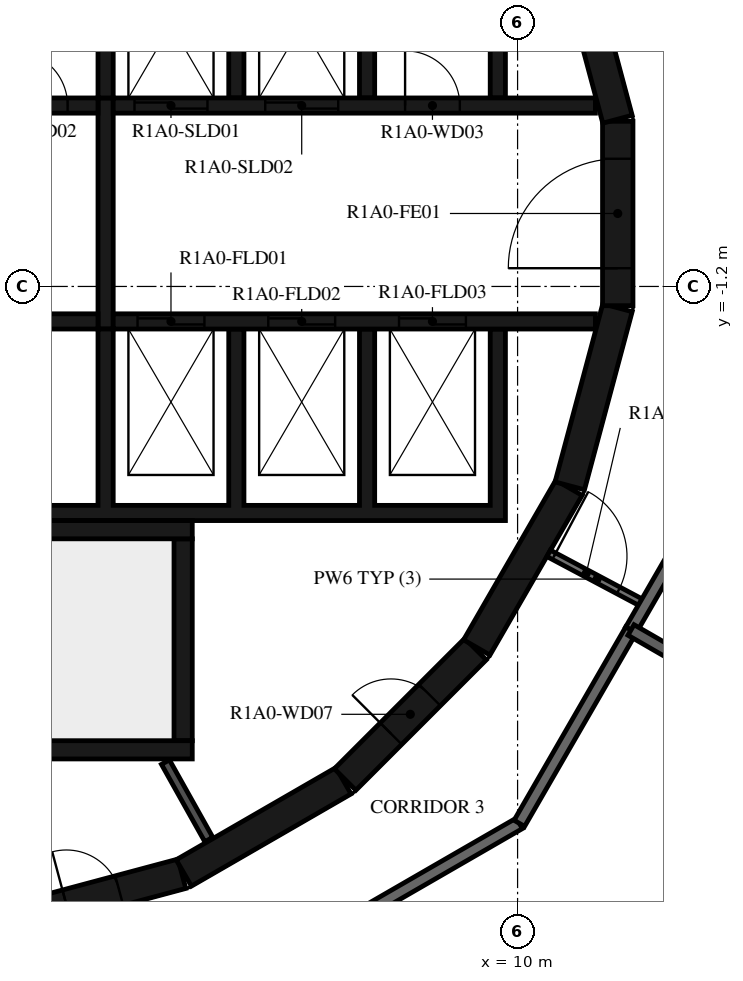
"""IFC4 building model, lengths in metres.
Left out: names, types, materials, properties, quantities, classifications, styles, units other than length and angle.
Written with IfcOpenShell. Run it as: python <this file> out.ifc"""

import sys

from ifc_helpers import new_model, si_unit, direction, frame, frame_2d, origin, place, context, subcontext, project, spatial, polyline, rectangle, outline, extrude, element, fill, save


model = new_model("IFC4")
c1 = context("Model", 3, precision=1e-05, world=origin(), true_north=direction((0.0, 1.0)))
c2 = subcontext(c1, "Body", "Model", "MODEL_VIEW")
j1 = project(units=[si_unit("LENGTHUNIT", "METRE"), si_unit("PLANEANGLEUNIT", "RADIAN")], contexts=[c1])
p1 = place(None, origin())
s1 = spatial("IfcSite", under=j1, at=p1, CompositionType="ELEMENT")
p2 = place(p1, origin())
s2 = spatial("IfcBuilding", under=s1, at=p2, CompositionType="ELEMENT")
p3 = place(p2, frame((0.0, 0.0, 45.4)))
s3 = spatial("IfcBuildingStorey", under=s2, at=p3, CompositionType="ELEMENT", Elevation=45.4)
p4 = place(p3, frame((1.55, -11.643, 0.0), z_axis=(0.0, 0.0, 1.0), x_axis=(0.965948410781, 0.258734743916, 0.0)))
e1 = element("IfcWall", 1, at=p4, inside=s3, PredefinedType="SHEAR", context=c2, shape_type="SweptSolid", body=[
    extrude(rectangle(XDim=3.033, YDim=0.5, at=frame_2d((1.516, 0.0))), origin(), (0.0, 0.0, 1.0), 3.12),
])
p5 = place(p4, frame((1.066, 0.0, 0.0)))
e2 = element("IfcOpeningElement", 2, at=p5, cuts=e1, PredefinedType="OPENING", context=c2, shape_type="SweptSolid", body=[
    extrude(rectangle(XDim=0.9, YDim=2.1, at=frame_2d((0.45, 1.05))), frame((0.0, 0.26, 0.0), z_axis=(0.0, -1.0, 0.0), x_axis=(1.0, 0.0, 0.0)), (0.0, 0.0, 1.0), 0.52),
])
p6 = place(p3, frame((4.51, -10.845, 0.0), z_axis=(0.0, 0.0, 1.0), x_axis=(0.865975092491, 0.500087131594, 0.0)))
e3 = element("IfcWall", 3, at=p6, inside=s3, PredefinedType="SHEAR", context=c2, shape_type="SweptSolid", body=[
    extrude(rectangle(XDim=3.033, YDim=0.5, at=frame_2d((1.516, 0.0))), origin(), (0.0, 0.0, 1.0), 3.12),
])
p7 = place(p3, frame((7.164, -9.308, 0.0), z_axis=(0.0, 0.0, 1.0), x_axis=(0.707106781187, 0.707106781187, 0.0)))
e4 = element("IfcWall", 4, at=p7, inside=s3, PredefinedType="SHEAR", context=c2, shape_type="SweptSolid", body=[
    extrude(rectangle(XDim=3.032, YDim=0.5, at=frame_2d((1.516, 0.0))), origin(), (0.0, 0.0, 1.0), 3.12),
])
p8 = place(p7, frame((1.066, 0.0, 0.0)))
e5 = element("IfcOpeningElement", 5, at=p8, cuts=e4, PredefinedType="OPENING", context=c2, shape_type="SweptSolid", body=[
    extrude(rectangle(XDim=0.9, YDim=2.1, at=frame_2d((0.45, 1.05))), frame((0.0, 0.26, 0.0), z_axis=(0.0, -1.0, 0.0), x_axis=(1.0, 0.0, 0.0)), (0.0, 0.0, 1.0), 0.52),
])
for number, where, z_axis, x_axis in (
    (6, (9.329, -7.137, 0.0), (0.0, 0.0, 1.0), (0.5, 0.866, 0.0)),
    (7, (10.858, -4.479, 0.0), (0.0, 0.0, 1.0), (0.259, 0.966, 0.0)),
):
    element("IfcWall", number, at=place(p3, frame(where, z_axis=z_axis, x_axis=x_axis)), inside=s3, PredefinedType="SHEAR", context=c2, shape_type="SweptSolid", body=[
        extrude(rectangle(XDim=3.033, YDim=0.5, at=frame_2d((1.516, 0.0))), origin(), (0.0, 0.0, 1.0), 3.12),
    ])
p9 = place(p3, frame((11.647, -1.516, 0.0), z_axis=(0.0, 0.0, 1.0), x_axis=(0.0, 1.0, 0.0)))
e8 = element("IfcWall", 8, at=p9, inside=s3, PredefinedType="SHEAR", context=c2, shape_type="SweptSolid", body=[
    extrude(rectangle(XDim=3.033, YDim=0.5, at=frame_2d((1.516, 0.0))), origin(), (0.0, 0.0, 1.0), 3.12),
])
p10 = place(p9, frame((0.616, 0.0, 0.0)))
e9 = element("IfcOpeningElement", 9, at=p10, cuts=e8, PredefinedType="OPENING", context=c2, shape_type="SweptSolid", body=[
    extrude(rectangle(XDim=1.8, YDim=2.1, at=frame_2d((0.9, 1.05))), frame((0.0, 0.26, 0.0), z_axis=(0.0, -1.0, 0.0), x_axis=(1.0, 0.0, 0.0)), (0.0, 0.0, 1.0), 0.52),
])
p11 = place(p3, frame((11.643, 1.55, 0.0), z_axis=(0.0, 0.0, 1.0), x_axis=(-0.258734743916, 0.965948410781, 0.0)))
e10 = element("IfcWall", 10, at=p11, inside=s3, PredefinedType="SHEAR", context=c2, shape_type="SweptSolid", body=[
    extrude(rectangle(XDim=3.033, YDim=0.5, at=frame_2d((1.516, 0.0))), origin(), (0.0, 0.0, 1.0), 3.12),
])
p12 = place(p3, frame((-2.4, -5.2, 0.0), z_axis=(0.0, 0.0, 1.0), x_axis=(1.0, 0.0, 0.0)))
e11 = element("IfcWall", 11, at=p12, inside=s3, PredefinedType="SHEAR", context=c2, shape_type="SweptSolid", body=[
    extrude(rectangle(XDim=7.05, YDim=0.3, at=frame_2d((3.525, 0.0))), origin(), (0.0, 0.0, 1.0), 3.12),
])
p13 = place(p3, frame((4.5, -8.67, 0.0), z_axis=(0.0, 0.0, 1.0), x_axis=(0.0, 1.0, 0.0)))
e12 = element("IfcWall", 12, at=p13, inside=s3, PredefinedType="SHEAR", context=c2, shape_type="SweptSolid", body=[
    extrude(rectangle(XDim=3.32, YDim=0.3, at=frame_2d((1.66, 0.0))), origin(), (0.0, 0.0, 1.0), 3.12),
])
p14 = place(p3, frame((0.1, -8.82, 0.0), z_axis=(0.0, 0.0, 1.0), x_axis=(1.0, 0.0, 0.0)))
e13 = element("IfcWall", 13, at=p14, inside=s3, PredefinedType="SHEAR", context=c2, shape_type="SweptSolid", body=[
    extrude(rectangle(XDim=4.55, YDim=0.3, at=frame_2d((2.275, 0.0))), origin(), (0.0, 0.0, 1.0), 3.12),
])
p15 = place(p3, origin())
e14 = element("IfcWall", 14, at=p15, inside=s3, PredefinedType="SHEAR", context=c2, shape_type="SweptSolid", body=[
    extrude(outline(polyline([(-9.55, 4.8), (-7.65, 4.8), (-7.65, 1.9), (-7.4, 1.9), (-7.4, 4.8), (-5.5, 4.8), (-5.5, 1.9), (-5.25, 1.9), (-5.25, 4.8), (-3.35, 4.8), (-3.35, 1.9), (-3.1, 1.9), (-3.1, 4.8), (-1.2, 4.8), (-1.2, 1.9), (-0.95, 1.9), (-0.95, 4.8), (0.95, 4.8), (0.95, 1.9), (1.2, 1.9), (1.2, 4.8), (3.1, 4.8), (3.1, 1.9), (3.35, 1.9), (3.35, 4.8), (5.25, 4.8), (5.25, 1.9), (5.5, 1.9), (5.5, 4.8), (7.4, 4.8), (7.4, 1.9), (7.65, 1.9), (7.65, 4.8), (9.55, 4.8), (9.55, 1.9), (9.8, 1.9), (9.8, 4.8), (9.8, 5.05), (-9.8, 5.05), (-9.8, 4.8), (-9.8, 1.9), (-9.55, 1.9), (-9.55, 4.8)])), origin(), (0.0, 0.0, 1.0), 3.12),
])
p16 = place(p3, origin())
e15 = element("IfcWall", 15, at=p16, inside=s3, PredefinedType="SHEAR", context=c2, shape_type="SweptSolid", body=[
    extrude(outline(polyline([(9.8, -5.05), (9.8, -4.8), (9.8, -1.9), (9.55, -1.9), (9.55, -4.8), (7.65, -4.8), (7.65, -1.9), (7.4, -1.9), (7.4, -4.8), (5.5, -4.8), (5.5, -1.9), (5.25, -1.9), (5.25, -4.8), (3.35, -4.8), (3.35, -1.9), (3.1, -1.9), (3.1, -4.8), (-5.25, -4.8), (-5.25, -1.9), (-5.5, -1.9), (-5.5, -4.8), (-7.4, -4.8), (-7.4, -1.9), (-7.65, -1.9), (-7.65, -4.8), (-9.55, -4.8), (-9.55, -1.9), (-9.8, -1.9), (-9.8, -4.8), (-9.8, -5.05), (9.8, -5.05)])), origin(), (0.0, 0.0, 1.0), 3.12),
])
p17 = place(p3, frame((-11.28, 1.775, 0.0), z_axis=(0.0, 0.0, 1.0), x_axis=(1.0, 0.0, 0.0)))
e16 = element("IfcWall", 16, at=p17, inside=s3, PredefinedType="SHEAR", context=c2, shape_type="SweptSolid", body=[
    extrude(rectangle(XDim=14.38, YDim=0.25, at=frame_2d((7.19, 0.0))), origin(), (0.0, 0.0, 1.0), 3.12),
])
p18 = place(p17, frame((2.13, 0.0, 0.0)))
e17 = element("IfcOpeningElement", 17, at=p18, cuts=e16, PredefinedType="OPENING", context=c2, shape_type="SweptSolid", body=[
    extrude(rectangle(XDim=1.1, YDim=2.1, at=frame_2d((0.55, 1.05))), frame((0.0, 0.135, 0.0), z_axis=(0.0, -1.0, 0.0), x_axis=(1.0, 0.0, 0.0)), (0.0, 0.0, 1.0), 0.27),
])
p19 = place(p17, frame((4.28, 0.0, 0.0)))
e18 = element("IfcOpeningElement", 18, at=p19, cuts=e16, PredefinedType="OPENING", context=c2, shape_type="SweptSolid", body=[
    extrude(rectangle(XDim=1.1, YDim=2.1, at=frame_2d((0.55, 1.05))), frame((0.0, 0.135, 0.0), z_axis=(0.0, -1.0, 0.0), x_axis=(1.0, 0.0, 0.0)), (0.0, 0.0, 1.0), 0.27),
])
p20 = place(p17, frame((6.43, 0.0, 0.0)))
e19 = element("IfcOpeningElement", 19, at=p20, cuts=e16, PredefinedType="OPENING", context=c2, shape_type="SweptSolid", body=[
    extrude(rectangle(XDim=1.1, YDim=2.1, at=frame_2d((0.55, 1.05))), frame((0.0, 0.135, 0.0), z_axis=(0.0, -1.0, 0.0), x_axis=(1.0, 0.0, 0.0)), (0.0, 0.0, 1.0), 0.27),
])
p21 = place(p17, frame((8.58, 0.0, 0.0)))
e20 = element("IfcOpeningElement", 20, at=p21, cuts=e16, PredefinedType="OPENING", context=c2, shape_type="SweptSolid", body=[
    extrude(rectangle(XDim=1.1, YDim=2.1, at=frame_2d((0.55, 1.05))), frame((0.0, 0.135, 0.0), z_axis=(0.0, -1.0, 0.0), x_axis=(1.0, 0.0, 0.0)), (0.0, 0.0, 1.0), 0.27),
])
p22 = place(p17, frame((10.83, 0.0, 0.0)))
e21 = element("IfcOpeningElement", 21, at=p22, cuts=e16, PredefinedType="OPENING", context=c2, shape_type="SweptSolid", body=[
    extrude(rectangle(XDim=0.9, YDim=2.1, at=frame_2d((0.45, 1.05))), frame((0.0, 0.135, 0.0), z_axis=(0.0, -1.0, 0.0), x_axis=(1.0, 0.0, 0.0)), (0.0, 0.0, 1.0), 0.27),
])
p23 = place(p17, frame((12.98, 0.0, 0.0)))
e22 = element("IfcOpeningElement", 22, at=p23, cuts=e16, PredefinedType="OPENING", context=c2, shape_type="SweptSolid", body=[
    extrude(rectangle(XDim=0.9, YDim=2.1, at=frame_2d((0.45, 1.05))), frame((0.0, 0.135, 0.0), z_axis=(0.0, -1.0, 0.0), x_axis=(1.0, 0.0, 0.0)), (0.0, 0.0, 1.0), 0.27),
])
p24 = place(p3, frame((3.35, 1.775, 0.0), z_axis=(0.0, 0.0, 1.0), x_axis=(1.0, 0.0, 0.0)))
e23 = element("IfcWall", 23, at=p24, inside=s3, PredefinedType="SHEAR", context=c2, shape_type="SweptSolid", body=[
    extrude(rectangle(XDim=7.93, YDim=0.25, at=frame_2d((3.965, 0.0))), origin(), (0.0, 0.0, 1.0), 3.12),
])
p25 = place(p24, frame((0.35, 0.0, 0.0)))
e24 = element("IfcOpeningElement", 24, at=p25, cuts=e23, PredefinedType="OPENING", context=c2, shape_type="SweptSolid", body=[
    extrude(rectangle(XDim=1.2, YDim=2.4, at=frame_2d((0.6, 1.2))), frame((0.0, 0.135, 0.0), z_axis=(0.0, -1.0, 0.0), x_axis=(1.0, 0.0, 0.0)), (0.0, 0.0, 1.0), 0.27),
])
p26 = place(p24, frame((2.5, 0.0, 0.0)))
e25 = element("IfcOpeningElement", 25, at=p26, cuts=e23, PredefinedType="OPENING", context=c2, shape_type="SweptSolid", body=[
    extrude(rectangle(XDim=1.2, YDim=2.4, at=frame_2d((0.6, 1.2))), frame((0.0, 0.135, 0.0), z_axis=(0.0, -1.0, 0.0), x_axis=(1.0, 0.0, 0.0)), (0.0, 0.0, 1.0), 0.27),
])
p27 = place(p24, frame((4.8, 0.0, 0.0)))
e26 = element("IfcOpeningElement", 26, at=p27, cuts=e23, PredefinedType="OPENING", context=c2, shape_type="SweptSolid", body=[
    extrude(rectangle(XDim=0.9, YDim=2.1, at=frame_2d((0.45, 1.05))), frame((0.0, 0.135, 0.0), z_axis=(0.0, -1.0, 0.0), x_axis=(1.0, 0.0, 0.0)), (0.0, 0.0, 1.0), 0.27),
])
p28 = place(p3, frame((-11.28, -1.775, 0.0), z_axis=(0.0, 0.0, 1.0), x_axis=(1.0, 0.0, 0.0)))
e27 = element("IfcWall", 27, at=p28, inside=s3, PredefinedType="SHEAR", context=c2, shape_type="SweptSolid", body=[
    extrude(rectangle(XDim=14.38, YDim=0.25, at=frame_2d((7.19, 0.0))), origin(), (0.0, 0.0, 1.0), 3.12),
])
p29 = place(p28, frame((9.755, 0.0, 0.0)))
e28 = element("IfcOpeningElement", 28, at=p29, cuts=e27, PredefinedType="OPENING", context=c2, shape_type="SweptSolid", body=[
    extrude(rectangle(XDim=0.9, YDim=2.1, at=frame_2d((0.45, 1.05))), frame((0.0, 0.135, 0.0), z_axis=(0.0, -1.0, 0.0), x_axis=(1.0, 0.0, 0.0)), (0.0, 0.0, 1.0), 0.27),
])
p30 = place(p3, frame((3.35, -1.775, 0.0), z_axis=(0.0, 0.0, 1.0), x_axis=(1.0, 0.0, 0.0)))
e29 = element("IfcWall", 29, at=p30, inside=s3, PredefinedType="SHEAR", context=c2, shape_type="SweptSolid", body=[
    extrude(rectangle(XDim=7.93, YDim=0.25, at=frame_2d((3.965, 0.0))), origin(), (0.0, 0.0, 1.0), 3.12),
])
p31 = place(p30, frame((0.4, 0.0, 0.0)))
e30 = element("IfcOpeningElement", 30, at=p31, cuts=e29, PredefinedType="OPENING", context=c2, shape_type="SweptSolid", body=[
    extrude(rectangle(XDim=1.1, YDim=2.4, at=frame_2d((0.55, 1.2))), frame((0.0, 0.135, 0.0), z_axis=(0.0, -1.0, 0.0), x_axis=(1.0, 0.0, 0.0)), (0.0, 0.0, 1.0), 0.27),
])
p32 = place(p30, frame((2.55, 0.0, 0.0)))
e31 = element("IfcOpeningElement", 31, at=p32, cuts=e29, PredefinedType="OPENING", context=c2, shape_type="SweptSolid", body=[
    extrude(rectangle(XDim=1.1, YDim=2.4, at=frame_2d((0.55, 1.2))), frame((0.0, 0.135, 0.0), z_axis=(0.0, -1.0, 0.0), x_axis=(1.0, 0.0, 0.0)), (0.0, 0.0, 1.0), 0.27),
])
p33 = place(p30, frame((4.7, 0.0, 0.0)))
e32 = element("IfcOpeningElement", 32, at=p33, cuts=e29, PredefinedType="OPENING", context=c2, shape_type="SweptSolid", body=[
    extrude(rectangle(XDim=1.1, YDim=2.4, at=frame_2d((0.55, 1.2))), frame((0.0, 0.135, 0.0), z_axis=(0.0, -1.0, 0.0), x_axis=(1.0, 0.0, 0.0)), (0.0, 0.0, 1.0), 0.27),
])
p34 = place(p3, frame((3.225, -1.9, 0.0), z_axis=(0.0, 0.0, 1.0), x_axis=(0.0, 1.0, 0.0)))
e33 = element("IfcWall", 33, at=p34, inside=s3, PredefinedType="SHEAR", context=c2, shape_type="SweptSolid", body=[
    extrude(rectangle(XDim=3.8, YDim=0.25, at=frame_2d((1.9, 0.0))), origin(), (0.0, 0.0, 1.0), 3.12),
])
p35 = place(p3, frame((4.922, -10.296, 0.0), z_axis=(0.0, 0.0, 1.0), x_axis=(-0.48860846254, 0.872503163509, 0.0)))
e34 = element("IfcWall", 34, at=p35, inside=s3, PredefinedType="PARTITIONING", context=c2, shape_type="SweptSolid", body=[
    extrude(rectangle(XDim=1.459, YDim=0.15, at=frame_2d((0.73, 0.0))), origin(), (0.0, 0.0, 1.0), 3.12),
])
p36 = place(p3, frame((10.511, -5.589, 0.0), z_axis=(0.0, 0.0, 1.0), x_axis=(0.88294043061, -0.469485032769, 0.0)))
e35 = element("IfcWall", 35, at=p36, inside=s3, PredefinedType="PARTITIONING", context=c2, shape_type="SweptSolid", body=[
    extrude(rectangle(XDim=1.804, YDim=0.12, at=frame_2d((0.902, 0.0))), origin(), (0.0, 0.0, 1.0), 3.12),
])
p37 = place(p36, frame((0.1, 0.0, 0.0)))
e36 = element("IfcOpeningElement", 36, at=p37, cuts=e35, PredefinedType="OPENING", context=c2, shape_type="SweptSolid", body=[
    extrude(rectangle(XDim=1.2, YDim=2.1, at=frame_2d((0.6, 1.05))), frame((0.0, 0.07, 0.0), z_axis=(0.0, -1.0, 0.0), x_axis=(1.0, 0.0, 0.0)), (0.0, 0.0, 1.0), 0.14),
])
p38 = place(p3, frame((11.865, -6.849, 0.0), z_axis=(0.0, 0.0, 1.0), x_axis=(0.500002704028, 0.866023842607, 0.0)))
e37 = element("IfcWall", 37, at=p38, inside=s3, PredefinedType="STANDARD", context=c2, shape_type="SweptSolid", body=[
    extrude(rectangle(XDim=3.67, YDim=0.2, at=frame_2d((1.835, 0.0))), origin(), (0.0, 0.0, 1.0), 3.12),
])
p39 = place(p3, frame((3.671, -13.7, 0.0), z_axis=(0.0, 0.0, 1.0), x_axis=(0.866024439905, 0.500001669485, 0.0)))
e38 = element("IfcWall", 38, at=p39, inside=s3, PredefinedType="STANDARD", context=c2, shape_type="SweptSolid", body=[
    extrude(rectangle(XDim=7.342, YDim=0.2, at=frame_2d((3.671, 0.0))), origin(), (0.0, 0.0, 1.0), 3.12),
])
p40 = place(p3, frame((10.029, -10.029, 0.0), z_axis=(0.0, 0.0, 1.0), x_axis=(0.50001606911, 0.866016126081, 0.0)))
e39 = element("IfcWall", 39, at=p40, inside=s3, PredefinedType="STANDARD", context=c2, shape_type="SweptSolid", body=[
    extrude(rectangle(XDim=3.671, YDim=0.2, at=frame_2d((1.835, 0.0))), origin(), (0.0, 0.0, 1.0), 3.12),
])
p41 = place(p3, frame((18.694, -10.793, 0.0), z_axis=(0.0, 0.0, 1.0), x_axis=(-0.865964895271, 0.500104789178, 0.0)))
e40 = element("IfcWall", 40, at=p41, inside=s3, PredefinedType="STANDARD", context=c2, shape_type="SweptSolid", body=[
    extrude(rectangle(XDim=7.885, YDim=0.2, at=frame_2d((3.943, 0.0))), origin(), (0.0, 0.0, 1.0), 3.12),
])
p42 = place(p10, origin())
e41 = element("IfcDoor", 41, at=p42, inside=s3, OperationType="DOUBLE_DOOR_SINGLE_SWING", PredefinedType="DOOR", context=c2, shape_type="SweptSolid", body=[
    extrude(rectangle(XDim=1.8, YDim=2.1, at=frame_2d((0.9, 1.05))), frame((0.0, 0.025, 0.0), z_axis=(0.0, -1.0, 0.0), x_axis=(1.0, 0.0, 0.0)), (0.0, 0.0, 1.0), 0.05),
])
fill(e9, e41)
p43 = place(p25, origin())
e42 = element("IfcDoor", 42, at=p43, inside=s3, OperationType="DOUBLE_DOOR_SLIDING", PredefinedType="DOOR", context=c2, shape_type="SweptSolid", body=[
    extrude(rectangle(XDim=1.2, YDim=2.4, at=frame_2d((0.6, 1.2))), frame((0.0, 0.025, 0.0), z_axis=(0.0, -1.0, 0.0), x_axis=(1.0, 0.0, 0.0)), (0.0, 0.0, 1.0), 0.05),
])
fill(e24, e42)
p44 = place(p26, origin())
e43 = element("IfcDoor", 43, at=p44, inside=s3, OperationType="DOUBLE_DOOR_SLIDING", PredefinedType="DOOR", context=c2, shape_type="SweptSolid", body=[
    extrude(rectangle(XDim=1.2, YDim=2.4, at=frame_2d((0.6, 1.2))), frame((0.0, 0.025, 0.0), z_axis=(0.0, -1.0, 0.0), x_axis=(1.0, 0.0, 0.0)), (0.0, 0.0, 1.0), 0.05),
])
fill(e25, e43)
p45 = place(p31, origin())
e44 = element("IfcDoor", 44, at=p45, inside=s3, OperationType="DOUBLE_DOOR_SLIDING", PredefinedType="DOOR", context=c2, shape_type="SweptSolid", body=[
    extrude(rectangle(XDim=1.1, YDim=2.4, at=frame_2d((0.55, 1.2))), frame((0.0, 0.025, 0.0), z_axis=(0.0, -1.0, 0.0), x_axis=(1.0, 0.0, 0.0)), (0.0, 0.0, 1.0), 0.05),
])
fill(e30, e44)
p46 = place(p32, origin())
e45 = element("IfcDoor", 45, at=p46, inside=s3, OperationType="DOUBLE_DOOR_SLIDING", PredefinedType="DOOR", context=c2, shape_type="SweptSolid", body=[
    extrude(rectangle(XDim=1.1, YDim=2.4, at=frame_2d((0.55, 1.2))), frame((0.0, 0.025, 0.0), z_axis=(0.0, -1.0, 0.0), x_axis=(1.0, 0.0, 0.0)), (0.0, 0.0, 1.0), 0.05),
])
fill(e31, e45)
p47 = place(p33, origin())
e46 = element("IfcDoor", 46, at=p47, inside=s3, OperationType="DOUBLE_DOOR_SLIDING", PredefinedType="DOOR", context=c2, shape_type="SweptSolid", body=[
    extrude(rectangle(XDim=1.1, YDim=2.4, at=frame_2d((0.55, 1.2))), frame((0.0, 0.025, 0.0), z_axis=(0.0, -1.0, 0.0), x_axis=(1.0, 0.0, 0.0)), (0.0, 0.0, 1.0), 0.05),
])
fill(e32, e46)
p48 = place(p23, origin())
e47 = element("IfcDoor", 47, at=p48, inside=s3, OperationType="SINGLE_SWING_LEFT", PredefinedType="DOOR", context=c2, shape_type="SweptSolid", body=[
    extrude(rectangle(XDim=0.9, YDim=2.1, at=frame_2d((0.45, 1.05))), frame((0.0, 0.025, 0.0), z_axis=(0.0, -1.0, 0.0), x_axis=(1.0, 0.0, 0.0)), (0.0, 0.0, 1.0), 0.05),
])
fill(e22, e47)
p49 = place(p27, origin())
e48 = element("IfcDoor", 48, at=p49, inside=s3, OperationType="SINGLE_SWING_RIGHT", PredefinedType="DOOR", context=c2, shape_type="SweptSolid", body=[
    extrude(rectangle(XDim=0.9, YDim=2.1, at=frame_2d((0.45, 1.05))), frame((0.0, 0.025, 0.0), z_axis=(0.0, -1.0, 0.0), x_axis=(1.0, 0.0, 0.0)), (0.0, 0.0, 1.0), 0.05),
])
fill(e26, e48)
p50 = place(p8, origin())
e49 = element("IfcDoor", 49, at=p50, inside=s3, OperationType="SINGLE_SWING_RIGHT", PredefinedType="DOOR", context=c2, shape_type="SweptSolid", body=[
    extrude(rectangle(XDim=0.9, YDim=2.1, at=frame_2d((0.45, 1.05))), frame((0.0, 0.025, 0.0), z_axis=(0.0, -1.0, 0.0), x_axis=(1.0, 0.0, 0.0)), (0.0, 0.0, 1.0), 0.05),
])
fill(e5, e49)
p51 = place(p5, origin())
e50 = element("IfcDoor", 50, at=p51, inside=s3, OperationType="SINGLE_SWING_LEFT", PredefinedType="DOOR", context=c2, shape_type="SweptSolid", body=[
    extrude(rectangle(XDim=0.9, YDim=2.1, at=frame_2d((0.45, 1.05))), frame((0.0, 0.025, 0.0), z_axis=(0.0, -1.0, 0.0), x_axis=(1.0, 0.0, 0.0)), (0.0, 0.0, 1.0), 0.05),
])
fill(e2, e50)
p52 = place(p37, origin())
e51 = element("IfcDoor", 51, at=p52, inside=s3, OperationType="DOUBLE_DOOR_SINGLE_SWING", PredefinedType="DOOR", context=c2, shape_type="SweptSolid", body=[
    extrude(rectangle(XDim=1.2, YDim=2.1, at=frame_2d((0.6, 1.05))), frame((0.0, 0.025, 0.0), z_axis=(0.0, -1.0, 0.0), x_axis=(1.0, 0.0, 0.0)), (0.0, 0.0, 1.0), 0.05),
])
fill(e36, e51)
save(model, sys.argv[1])
